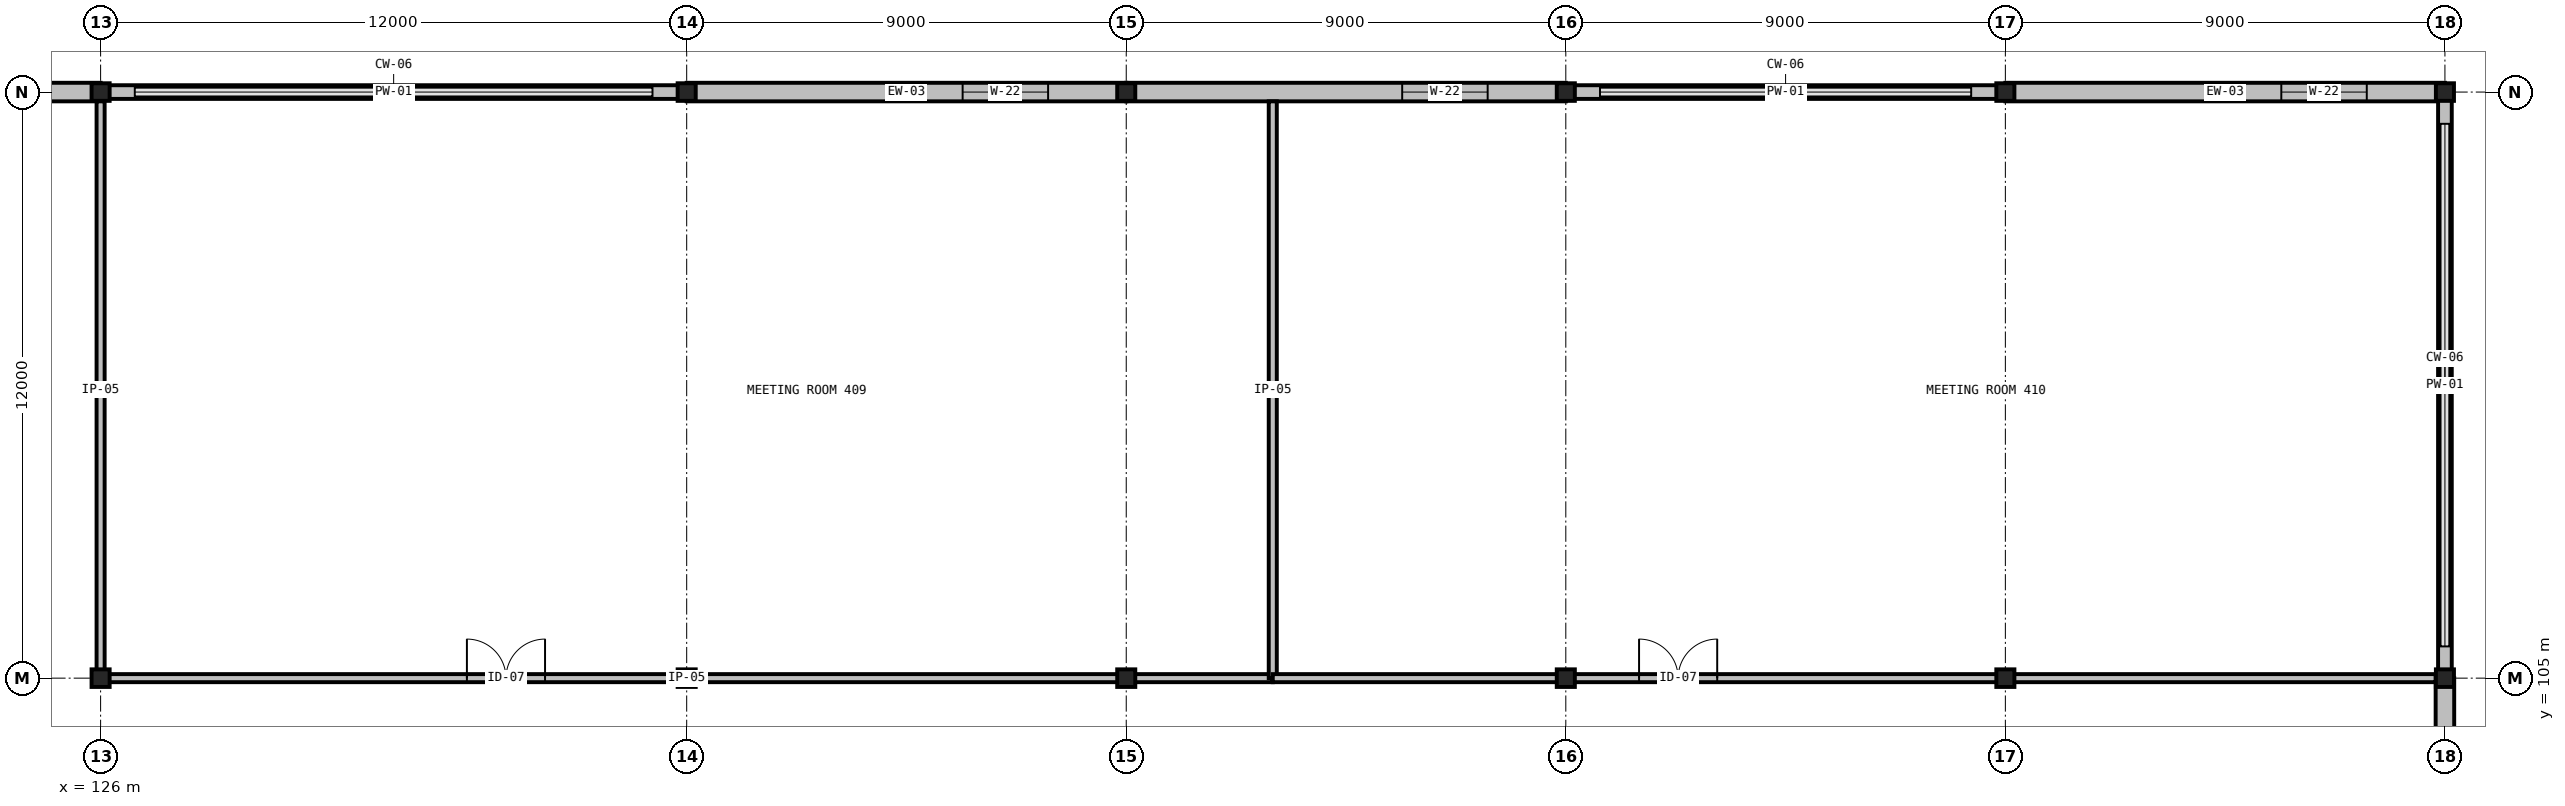
"""IFC4 building model, lengths in metres.
Left out: names, types, materials, properties, quantities, classifications, styles, units other than length and angle.
Written with IfcOpenShell. Run it as: python <this file> out.ifc"""

import sys

from ifc_helpers import new_model, si_unit, direction, frame, frame_2d, origin, origin_2d, place, context, subcontext, project, spatial, rectangle, i_section, extrude, element, fill, save


model = new_model("IFC4")
c1 = context("Model", 3, precision=1e-05, world=origin(), true_north=direction((0.0, 1.0)))
c2 = subcontext(c1, "Body", "Model", "MODEL_VIEW")
j1 = project(units=[si_unit("LENGTHUNIT", "METRE"), si_unit("PLANEANGLEUNIT", "RADIAN")], contexts=[c1])
p1 = place(None, origin())
s1 = spatial("IfcSite", under=j1, at=p1, CompositionType="ELEMENT")
p2 = place(p1, origin())
s2 = spatial("IfcBuilding", under=s1, at=p2, CompositionType="ELEMENT")
p3 = place(p2, frame((0.0, 0.0, 23.4)))
s3 = spatial("IfcBuildingStorey", under=s2, at=p3, CompositionType="ELEMENT", Elevation=23.4)
for number, where, z_axis, x_axis in (
    (1, (126.0, 105.0, 0.0), (0.0, 0.0, 1.0), (1.0, 0.0, 0.0)),
    (2, (126.0, 117.0, 0.0), (0.0, 0.0, 1.0), (1.0, 0.0, 0.0)),
    (3, (138.0, 105.0, 0.0), (0.0, 0.0, 1.0), (1.0, 0.0, 0.0)),
    (4, (138.0, 117.0, 0.0), (0.0, 0.0, 1.0), (1.0, 0.0, 0.0)),
    (5, (147.0, 105.0, 0.0), (0.0, 0.0, 1.0), (1.0, 0.0, 0.0)),
    (6, (147.0, 117.0, 0.0), (0.0, 0.0, 1.0), (1.0, 0.0, 0.0)),
    (7, (156.0, 105.0, 0.0), (0.0, 0.0, 1.0), (1.0, 0.0, 0.0)),
    (8, (156.0, 117.0, 0.0), (0.0, 0.0, 1.0), (1.0, 0.0, 0.0)),
    (9, (165.0, 105.0, 0.0), (0.0, 0.0, 1.0), (1.0, 0.0, 0.0)),
    (10, (165.0, 117.0, 0.0), (0.0, 0.0, 1.0), (1.0, 0.0, 0.0)),
    (11, (174.0, 105.0, 0.0), (0.0, 0.0, 1.0), (1.0, 0.0, 0.0)),
    (12, (174.0, 117.0, 0.0), (0.0, 0.0, 1.0), (1.0, 0.0, 0.0)),
):
    element("IfcColumn", number, at=place(p3, frame(where, z_axis=z_axis, x_axis=x_axis)), inside=s3, PredefinedType="COLUMN", context=c2, shape_type="SweptSolid", body=[
        extrude(i_section(OverallWidth=0.37, OverallDepth=0.36, WebThickness=0.012, FlangeThickness=0.02, FilletRadius=0.031, at=origin_2d()), origin(), (0.0, 0.0, 1.0), 3.85),
    ])
p4 = place(p3, frame((126.0, 117.0, 0.0), z_axis=(0.0, 0.0, 1.0), x_axis=(-1.0, 0.0, 0.0)))
e13 = element("IfcWall", 13, at=p4, inside=s3, PredefinedType="STANDARD", context=c2, shape_type="SweptSolid", body=[
    extrude(rectangle(XDim=12.0, YDim=0.38, at=frame_2d((6.0, 0.0))), origin(), (0.0, 0.0, 1.0), 2.626),
])
p5 = place(p4, frame((1.6, 0.0, 0.9)))
e14 = element("IfcOpeningElement", 14, at=p5, cuts=e13, PredefinedType="OPENING", context=c2, shape_type="SweptSolid", body=[
    extrude(rectangle(XDim=1.75, YDim=1.51, at=frame_2d((0.875, 0.755))), frame((0.0, 0.205, 0.0), z_axis=(0.0, -1.0, 0.0), x_axis=(1.0, 0.0, 0.0)), (0.0, 0.0, 1.0), 0.41),
])
p6 = place(p3, frame((138.0, 117.0, 0.0), z_axis=(0.0, 0.0, 1.0), x_axis=(-1.0, 0.0, 0.0)))
e15 = element("IfcWall", 15, at=p6, inside=s3, PredefinedType="PARAPET", context=c2, shape_type="SweptSolid", body=[
    extrude(rectangle(XDim=12.0, YDim=0.28, at=frame_2d((6.0, 0.0))), origin(), (0.0, 0.0, 1.0), 0.2),
])
p7 = place(p3, frame((147.0, 117.0, 0.0), z_axis=(0.0, 0.0, 1.0), x_axis=(-1.0, 0.0, 0.0)))
e16 = element("IfcWall", 16, at=p7, inside=s3, PredefinedType="STANDARD", context=c2, shape_type="SweptSolid", body=[
    extrude(rectangle(XDim=9.0, YDim=0.38, at=frame_2d((4.5, 0.0))), origin(), (0.0, 0.0, 1.0), 2.626),
])
p8 = place(p7, frame((1.6, 0.0, 0.9)))
e17 = element("IfcOpeningElement", 17, at=p8, cuts=e16, PredefinedType="OPENING", context=c2, shape_type="SweptSolid", body=[
    extrude(rectangle(XDim=1.75, YDim=1.51, at=frame_2d((0.875, 0.755))), frame((0.0, 0.205, 0.0), z_axis=(0.0, -1.0, 0.0), x_axis=(1.0, 0.0, 0.0)), (0.0, 0.0, 1.0), 0.41),
])
p9 = place(p3, frame((156.0, 117.0, 0.0), z_axis=(0.0, 0.0, 1.0), x_axis=(-1.0, 0.0, 0.0)))
e18 = element("IfcWall", 18, at=p9, inside=s3, PredefinedType="STANDARD", context=c2, shape_type="SweptSolid", body=[
    extrude(rectangle(XDim=9.0, YDim=0.38, at=frame_2d((4.5, 0.0))), origin(), (0.0, 0.0, 1.0), 2.626),
])
p10 = place(p9, frame((1.6, 0.0, 0.9)))
e19 = element("IfcOpeningElement", 19, at=p10, cuts=e18, PredefinedType="OPENING", context=c2, shape_type="SweptSolid", body=[
    extrude(rectangle(XDim=1.75, YDim=1.51, at=frame_2d((0.875, 0.755))), frame((0.0, 0.205, 0.0), z_axis=(0.0, -1.0, 0.0), x_axis=(1.0, 0.0, 0.0)), (0.0, 0.0, 1.0), 0.41),
])
p11 = place(p3, frame((165.0, 117.0, 0.0), z_axis=(0.0, 0.0, 1.0), x_axis=(-1.0, 0.0, 0.0)))
e20 = element("IfcWall", 20, at=p11, inside=s3, PredefinedType="PARAPET", context=c2, shape_type="SweptSolid", body=[
    extrude(rectangle(XDim=9.0, YDim=0.28, at=frame_2d((4.5, 0.0))), origin(), (0.0, 0.0, 1.0), 0.2),
])
p12 = place(p3, frame((174.0, 117.0, 0.0), z_axis=(0.0, 0.0, 1.0), x_axis=(-1.0, 0.0, 0.0)))
e21 = element("IfcWall", 21, at=p12, inside=s3, PredefinedType="STANDARD", context=c2, shape_type="SweptSolid", body=[
    extrude(rectangle(XDim=9.0, YDim=0.38, at=frame_2d((4.5, 0.0))), origin(), (0.0, 0.0, 1.0), 2.626),
])
p13 = place(p12, frame((1.6, 0.0, 0.9)))
e22 = element("IfcOpeningElement", 22, at=p13, cuts=e21, PredefinedType="OPENING", context=c2, shape_type="SweptSolid", body=[
    extrude(rectangle(XDim=1.75, YDim=1.51, at=frame_2d((0.875, 0.755))), frame((0.0, 0.205, 0.0), z_axis=(0.0, -1.0, 0.0), x_axis=(1.0, 0.0, 0.0)), (0.0, 0.0, 1.0), 0.41),
])
p14 = place(p3, frame((174.0, 96.0, 0.0), z_axis=(0.0, 0.0, 1.0), x_axis=(0.0, 1.0, 0.0)))
e23 = element("IfcWall", 23, at=p14, inside=s3, PredefinedType="STANDARD", context=c2, shape_type="SweptSolid", body=[
    extrude(rectangle(XDim=9.0, YDim=0.38, at=frame_2d((4.5, 0.0))), origin(), (0.0, 0.0, 1.0), 3.119),
])
p15 = place(p3, frame((174.0, 105.0, 0.0), z_axis=(0.0, 0.0, 1.0), x_axis=(0.0, 1.0, 0.0)))
e24 = element("IfcWall", 24, at=p15, inside=s3, PredefinedType="PARAPET", context=c2, shape_type="SweptSolid", body=[
    extrude(rectangle(XDim=12.0, YDim=0.28, at=frame_2d((6.0, 0.0))), origin(), (0.0, 0.0, 1.0), 0.2),
])
p16 = place(p3, frame((173.86, 81.28, 3.85), z_axis=(0.0, 0.0, 1.0), x_axis=(0.0, 1.0, 0.0)))
e25 = element("IfcWall", 25, at=p16, inside=s3, PredefinedType="PARAPET", context=c2, shape_type="SweptSolid", body=[
    extrude(rectangle(XDim=35.44, YDim=0.28, at=frame_2d((17.72, 0.0))), origin(), (0.0, 0.0, 1.0), 1.2),
])
p17 = place(p3, frame((174.0, 116.86, 3.85), z_axis=(0.0, 0.0, 1.0), x_axis=(-1.0, 0.0, 0.0)))
e26 = element("IfcWall", 26, at=p17, inside=s3, PredefinedType="PARAPET", context=c2, shape_type="SweptSolid", body=[
    extrude(rectangle(XDim=78.0, YDim=0.28, at=frame_2d((39.0, 0.0))), origin(), (0.0, 0.0, 1.0), 1.2),
])
p18 = place(p3, frame((126.0, 105.0, 0.0), z_axis=(0.0, 0.0, 1.0), x_axis=(1.0, 0.0, 0.0)))
e27 = element("IfcWall", 27, at=p18, inside=s3, PredefinedType="PARTITIONING", context=c2, shape_type="SweptSolid", body=[
    extrude(rectangle(XDim=24.0, YDim=0.165, at=frame_2d((12.0, 0.0))), origin(), (0.0, 0.0, 1.0), 2.752),
])
p19 = place(p18, frame((7.5, 0.0, 0.0)))
e28 = element("IfcOpeningElement", 28, at=p19, cuts=e27, PredefinedType="OPENING", context=c2, shape_type="SweptSolid", body=[
    extrude(rectangle(XDim=1.6, YDim=2.25, at=frame_2d((0.8, 1.125))), frame((0.0, 0.098, 0.0), z_axis=(0.0, -1.0, 0.0), x_axis=(1.0, 0.0, 0.0)), (0.0, 0.0, 1.0), 0.195),
])
p20 = place(p3, frame((150.0, 105.0, 0.0), z_axis=(0.0, 0.0, 1.0), x_axis=(0.0, 1.0, 0.0)))
e29 = element("IfcWall", 29, at=p20, inside=s3, PredefinedType="PARTITIONING", context=c2, shape_type="SweptSolid", body=[
    extrude(rectangle(XDim=11.81, YDim=0.165, at=frame_2d((5.905, 0.0))), origin(), (0.0, 0.0, 1.0), 3.53),
])
p21 = place(p3, frame((126.0, 116.81, 0.0), z_axis=(0.0, 0.0, 1.0), x_axis=(0.0, -1.0, 0.0)))
e30 = element("IfcWall", 30, at=p21, inside=s3, PredefinedType="PARTITIONING", context=c2, shape_type="SweptSolid", body=[
    extrude(rectangle(XDim=11.81, YDim=0.165, at=frame_2d((5.905, 0.0))), origin(), (0.0, 0.0, 1.0), 2.68),
])
p22 = place(p3, frame((150.0, 105.0, 0.0), z_axis=(0.0, 0.0, 1.0), x_axis=(1.0, 0.0, 0.0)))
e31 = element("IfcWall", 31, at=p22, inside=s3, PredefinedType="PARTITIONING", context=c2, shape_type="SweptSolid", body=[
    extrude(rectangle(XDim=23.81, YDim=0.165, at=frame_2d((11.905, 0.0))), origin(), (0.0, 0.0, 1.0), 2.837),
])
p23 = place(p22, frame((7.5, 0.0, 0.0)))
e32 = element("IfcOpeningElement", 32, at=p23, cuts=e31, PredefinedType="OPENING", context=c2, shape_type="SweptSolid", body=[
    extrude(rectangle(XDim=1.6, YDim=2.25, at=frame_2d((0.8, 1.125))), frame((0.0, 0.098, 0.0), z_axis=(0.0, -1.0, 0.0), x_axis=(1.0, 0.0, 0.0)), (0.0, 0.0, 1.0), 0.195),
])
p24 = place(p8, origin())
e33 = element("IfcWindow", 33, at=p24, inside=s3, PartitioningType="SINGLE_PANEL", PredefinedType="WINDOW", context=c2, shape_type="SweptSolid", body=[
    extrude(rectangle(XDim=1.75, YDim=1.51, at=frame_2d((0.875, 0.755))), frame((0.0, 0.03, 0.0), z_axis=(0.0, -1.0, 0.0), x_axis=(1.0, 0.0, 0.0)), (0.0, 0.0, 1.0), 0.06),
])
fill(e17, e33)
p25 = place(p10, origin())
e34 = element("IfcWindow", 34, at=p25, inside=s3, PartitioningType="SINGLE_PANEL", PredefinedType="WINDOW", context=c2, shape_type="SweptSolid", body=[
    extrude(rectangle(XDim=1.75, YDim=1.51, at=frame_2d((0.875, 0.755))), frame((0.0, 0.03, 0.0), z_axis=(0.0, -1.0, 0.0), x_axis=(1.0, 0.0, 0.0)), (0.0, 0.0, 1.0), 0.06),
])
fill(e19, e34)
p26 = place(p13, origin())
e35 = element("IfcWindow", 35, at=p26, inside=s3, PartitioningType="SINGLE_PANEL", PredefinedType="WINDOW", context=c2, shape_type="SweptSolid", body=[
    extrude(rectangle(XDim=1.75, YDim=1.51, at=frame_2d((0.875, 0.755))), frame((0.0, 0.03, 0.0), z_axis=(0.0, -1.0, 0.0), x_axis=(1.0, 0.0, 0.0)), (0.0, 0.0, 1.0), 0.06),
])
fill(e22, e35)
p27 = place(p19, origin())
e36 = element("IfcDoor", 36, at=p27, inside=s3, OperationType="DOUBLE_DOOR_SINGLE_SWING", PredefinedType="DOOR", context=c2, shape_type="SweptSolid", body=[
    extrude(rectangle(XDim=1.6, YDim=2.25, at=frame_2d((0.8, 1.125))), frame((0.0, 0.025, 0.0), z_axis=(0.0, -1.0, 0.0), x_axis=(1.0, 0.0, 0.0)), (0.0, 0.0, 1.0), 0.05),
])
fill(e28, e36)
p28 = place(p23, origin())
e37 = element("IfcDoor", 37, at=p28, inside=s3, OperationType="DOUBLE_DOOR_SINGLE_SWING", PredefinedType="DOOR", context=c2, shape_type="SweptSolid", body=[
    extrude(rectangle(XDim=1.6, YDim=2.25, at=frame_2d((0.8, 1.125))), frame((0.0, 0.025, 0.0), z_axis=(0.0, -1.0, 0.0), x_axis=(1.0, 0.0, 0.0)), (0.0, 0.0, 1.0), 0.05),
])
fill(e32, e37)
save(model, sys.argv[1])
